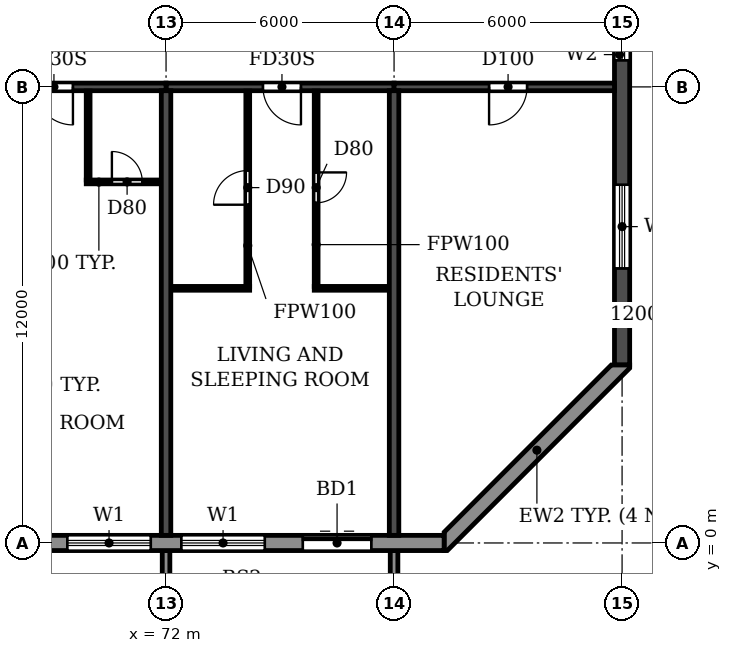
"""IFC4 building model, lengths in metres.
Left out: names, types, materials, properties, quantities, classifications, styles, units other than length and angle.
Written with IfcOpenShell. Run it as: python <this file> out.ifc"""

import sys

from ifc_helpers import new_model, si_unit, direction, frame, frame_2d, origin, place, context, subcontext, project, spatial, polyline, rectangle, outline, extrude, source, transform, mapped, element, fill, save


model = new_model("IFC4")
c1 = context("Model", 3, precision=1e-05, world=origin(), true_north=direction((0.0, 1.0)))
c2 = subcontext(c1, "Body", "Model", "MODEL_VIEW")
j1 = project(units=[si_unit("LENGTHUNIT", "METRE"), si_unit("PLANEANGLEUNIT", "RADIAN")], contexts=[c1])
p1 = place(None, origin())
s1 = spatial("IfcSite", under=j1, at=p1, CompositionType="ELEMENT")
p2 = place(p1, origin())
s2 = spatial("IfcBuilding", under=s1, at=p2, CompositionType="ELEMENT")
p3 = place(p2, frame((0.0, 0.0, 208.2)))
s3 = spatial("IfcBuildingStorey", under=s2, at=p3, CompositionType="ELEMENT", Elevation=208.2)
for number, where, z_axis, x_axis in (
    (1, (72.0, 0.2, 0.0), (0.0, 0.0, 1.0), (0.0, 1.0, 0.0)),
    (2, (78.0, 0.2, 0.0), (0.0, 0.0, 1.0), (0.0, 1.0, 0.0)),
):
    element("IfcWall", number, at=place(p3, frame(where, z_axis=z_axis, x_axis=x_axis)), inside=s3, PredefinedType="SHEAR", context=c2, shape_type="SweptSolid", body=[
        extrude(rectangle(XDim=11.7, YDim=0.25, at=frame_2d((5.85, 0.0))), origin(), (0.0, 0.0, 1.0), 3.0),
    ])
p4 = place(p3, frame((84.0, 4.683, 0.0), z_axis=(0.0, 0.0, 1.0), x_axis=(0.0, 1.0, 0.0)))
e3 = element("IfcWall", 3, at=p4, inside=s3, PredefinedType="SHEAR", context=c2, shape_type="SweptSolid", body=[
    extrude(rectangle(XDim=31.834, YDim=0.4, at=frame_2d((15.917, 0.0))), origin(), (0.0, 0.0, 1.0), 3.0),
])
p5 = place(p4, frame((23.817, 0.0, 0.9)))
e4 = element("IfcOpeningElement", 4, at=p5, cuts=e3, PredefinedType="OPENING", context=c2, shape_type="SweptSolid", body=[
    extrude(rectangle(XDim=1.2, YDim=1.5, at=frame_2d((0.6, 0.75))), frame((0.0, 0.21, 0.0), z_axis=(0.0, -1.0, 0.0), x_axis=(1.0, 0.0, 0.0)), (0.0, 0.0, 1.0), 0.42),
])
p6 = place(p4, frame((8.017, 0.0, 0.9)))
e5 = element("IfcOpeningElement", 5, at=p6, cuts=e3, PredefinedType="OPENING", context=c2, shape_type="SweptSolid", body=[
    extrude(rectangle(XDim=1.2, YDim=1.5, at=frame_2d((0.6, 0.75))), frame((0.0, 0.21, 0.0), z_axis=(0.0, -1.0, 0.0), x_axis=(1.0, 0.0, 0.0)), (0.0, 0.0, 1.0), 0.42),
])
p7 = place(p4, frame((27.694, 0.0, 0.6)))
e6 = element("IfcOpeningElement", 6, at=p7, cuts=e3, PredefinedType="OPENING", context=c2, shape_type="SweptSolid", body=[
    extrude(rectangle(XDim=2.2, YDim=1.8, at=frame_2d((1.1, 0.9))), frame((0.0, 0.21, 0.0), z_axis=(0.0, -1.0, 0.0), x_axis=(1.0, 0.0, 0.0)), (0.0, 0.0, 1.0), 0.42),
])
p8 = place(p4, frame((2.541, 0.0, 0.6)))
e7 = element("IfcOpeningElement", 7, at=p8, cuts=e3, PredefinedType="OPENING", context=c2, shape_type="SweptSolid", body=[
    extrude(rectangle(XDim=2.2, YDim=1.8, at=frame_2d((1.1, 0.9))), frame((0.0, 0.21, 0.0), z_axis=(0.0, -1.0, 0.0), x_axis=(1.0, 0.0, 0.0)), (0.0, 0.0, 1.0), 0.42),
])
p9 = place(p4, frame((15.917, 0.0, 0.9)))
e8 = element("IfcOpeningElement", 8, at=p9, cuts=e3, PredefinedType="OPENING", context=c2, shape_type="SweptSolid", body=[
    extrude(rectangle(XDim=1.2, YDim=1.5, at=frame_2d((0.6, 0.75))), frame((0.0, 0.21, 0.0), z_axis=(0.0, -1.0, 0.0), x_axis=(1.0, 0.0, 0.0)), (0.0, 0.0, 1.0), 0.42),
])
p10 = place(p3, frame((66.0, 12.0, 0.0), z_axis=(0.0, 0.0, 1.0), x_axis=(1.0, 0.0, 0.0)))
e9 = element("IfcWall", 9, at=p10, inside=s3, PredefinedType="SHEAR", context=c2, shape_type="SweptSolid", body=[
    extrude(rectangle(XDim=6.0, YDim=0.2, at=frame_2d((3.0, 0.0))), origin(), (0.0, 0.0, 1.0), 2.4),
])
p11 = place(p10, frame((2.55, 0.0, 0.0)))
e10 = element("IfcOpeningElement", 10, at=p11, cuts=e9, PredefinedType="OPENING", context=c2, shape_type="SweptSolid", body=[
    extrude(rectangle(XDim=1.0, YDim=2.1, at=frame_2d((0.5, 1.05))), frame((0.0, 0.11, 0.0), z_axis=(0.0, -1.0, 0.0), x_axis=(1.0, 0.0, 0.0)), (0.0, 0.0, 1.0), 0.22),
])
p12 = place(p3, frame((72.0, 12.0, 0.0), z_axis=(0.0, 0.0, 1.0), x_axis=(1.0, 0.0, 0.0)))
e11 = element("IfcWall", 11, at=p12, inside=s3, PredefinedType="SHEAR", context=c2, shape_type="SweptSolid", body=[
    extrude(rectangle(XDim=6.0, YDim=0.2, at=frame_2d((3.0, 0.0))), origin(), (0.0, 0.0, 1.0), 2.4),
])
p13 = place(p12, frame((2.55, 0.0, 0.0)))
e12 = element("IfcOpeningElement", 12, at=p13, cuts=e11, PredefinedType="OPENING", context=c2, shape_type="SweptSolid", body=[
    extrude(rectangle(XDim=1.0, YDim=2.1, at=frame_2d((0.5, 1.05))), frame((0.0, 0.11, 0.0), z_axis=(0.0, -1.0, 0.0), x_axis=(1.0, 0.0, 0.0)), (0.0, 0.0, 1.0), 0.22),
])
p14 = place(p3, frame((78.0, 12.0, 0.0), z_axis=(0.0, 0.0, 1.0), x_axis=(1.0, 0.0, 0.0)))
e13 = element("IfcWall", 13, at=p14, inside=s3, PredefinedType="SHEAR", context=c2, shape_type="SweptSolid", body=[
    extrude(rectangle(XDim=5.8, YDim=0.2, at=frame_2d((2.9, 0.0))), origin(), (0.0, 0.0, 1.0), 2.4),
])
p15 = place(p14, frame((2.5, 0.0, 0.0)))
e14 = element("IfcOpeningElement", 14, at=p15, cuts=e13, PredefinedType="OPENING", context=c2, shape_type="SweptSolid", body=[
    extrude(rectangle(XDim=1.0, YDim=2.1, at=frame_2d((0.5, 1.05))), frame((0.0, 0.11, 0.0), z_axis=(0.0, -1.0, 0.0), x_axis=(1.0, 0.0, 0.0)), (0.0, 0.0, 1.0), 0.22),
])
p16 = place(p3, frame((22.683, 0.0, 0.0), z_axis=(0.0, 0.0, 1.0), x_axis=(1.0, 0.0, 0.0)))
e15 = element("IfcWall", 15, at=p16, inside=s3, PredefinedType="STANDARD", context=c2, shape_type="SweptSolid", body=[
    extrude(rectangle(XDim=56.634, YDim=0.4, at=frame_2d((28.317, 0.0))), origin(), (0.0, 0.0, 1.0), 3.0),
])
p17 = place(p16, frame((1.917, 0.0, 0.0)))
e16 = element("IfcOpeningElement", 16, at=p17, cuts=e15, PredefinedType="OPENING", context=c2, shape_type="SweptSolid", body=[
    extrude(rectangle(XDim=1.8, YDim=2.4, at=frame_2d((0.9, 1.2))), frame((0.0, 0.21, 0.0), z_axis=(0.0, -1.0, 0.0), x_axis=(1.0, 0.0, 0.0)), (0.0, 0.0, 1.0), 0.42),
])
p18 = place(p16, frame((4.717, 0.0, 0.9)))
e17 = element("IfcOpeningElement", 17, at=p18, cuts=e15, PredefinedType="OPENING", context=c2, shape_type="SweptSolid", body=[
    extrude(rectangle(XDim=2.2, YDim=1.5, at=frame_2d((1.1, 0.75))), frame((0.0, 0.21, 0.0), z_axis=(0.0, -1.0, 0.0), x_axis=(1.0, 0.0, 0.0)), (0.0, 0.0, 1.0), 0.42),
])
p19 = place(p16, frame((7.717, 0.0, 0.9)))
e18 = element("IfcOpeningElement", 18, at=p19, cuts=e15, PredefinedType="OPENING", context=c2, shape_type="SweptSolid", body=[
    extrude(rectangle(XDim=2.2, YDim=1.5, at=frame_2d((1.1, 0.75))), frame((0.0, 0.21, 0.0), z_axis=(0.0, -1.0, 0.0), x_axis=(1.0, 0.0, 0.0)), (0.0, 0.0, 1.0), 0.42),
])
p20 = place(p16, frame((10.717, 0.0, 0.9)))
e19 = element("IfcOpeningElement", 19, at=p20, cuts=e15, PredefinedType="OPENING", context=c2, shape_type="SweptSolid", body=[
    extrude(rectangle(XDim=2.2, YDim=1.5, at=frame_2d((1.1, 0.75))), frame((0.0, 0.21, 0.0), z_axis=(0.0, -1.0, 0.0), x_axis=(1.0, 0.0, 0.0)), (0.0, 0.0, 1.0), 0.42),
])
p21 = place(p16, frame((13.917, 0.0, 0.0)))
e20 = element("IfcOpeningElement", 20, at=p21, cuts=e15, PredefinedType="OPENING", context=c2, shape_type="SweptSolid", body=[
    extrude(rectangle(XDim=1.8, YDim=2.4, at=frame_2d((0.9, 1.2))), frame((0.0, 0.21, 0.0), z_axis=(0.0, -1.0, 0.0), x_axis=(1.0, 0.0, 0.0)), (0.0, 0.0, 1.0), 0.42),
])
p22 = place(p16, frame((16.717, 0.0, 0.9)))
e21 = element("IfcOpeningElement", 21, at=p22, cuts=e15, PredefinedType="OPENING", context=c2, shape_type="SweptSolid", body=[
    extrude(rectangle(XDim=2.2, YDim=1.5, at=frame_2d((1.1, 0.75))), frame((0.0, 0.21, 0.0), z_axis=(0.0, -1.0, 0.0), x_axis=(1.0, 0.0, 0.0)), (0.0, 0.0, 1.0), 0.42),
])
p23 = place(p16, frame((19.717, 0.0, 0.9)))
e22 = element("IfcOpeningElement", 22, at=p23, cuts=e15, PredefinedType="OPENING", context=c2, shape_type="SweptSolid", body=[
    extrude(rectangle(XDim=2.2, YDim=1.5, at=frame_2d((1.1, 0.75))), frame((0.0, 0.21, 0.0), z_axis=(0.0, -1.0, 0.0), x_axis=(1.0, 0.0, 0.0)), (0.0, 0.0, 1.0), 0.42),
])
p24 = place(p16, frame((22.717, 0.0, 0.9)))
e23 = element("IfcOpeningElement", 23, at=p24, cuts=e15, PredefinedType="OPENING", context=c2, shape_type="SweptSolid", body=[
    extrude(rectangle(XDim=2.2, YDim=1.5, at=frame_2d((1.1, 0.75))), frame((0.0, 0.21, 0.0), z_axis=(0.0, -1.0, 0.0), x_axis=(1.0, 0.0, 0.0)), (0.0, 0.0, 1.0), 0.42),
])
p25 = place(p16, frame((25.917, 0.0, 0.0)))
e24 = element("IfcOpeningElement", 24, at=p25, cuts=e15, PredefinedType="OPENING", context=c2, shape_type="SweptSolid", body=[
    extrude(rectangle(XDim=1.8, YDim=2.4, at=frame_2d((0.9, 1.2))), frame((0.0, 0.21, 0.0), z_axis=(0.0, -1.0, 0.0), x_axis=(1.0, 0.0, 0.0)), (0.0, 0.0, 1.0), 0.42),
])
p26 = place(p16, frame((28.717, 0.0, 0.9)))
e25 = element("IfcOpeningElement", 25, at=p26, cuts=e15, PredefinedType="OPENING", context=c2, shape_type="SweptSolid", body=[
    extrude(rectangle(XDim=2.2, YDim=1.5, at=frame_2d((1.1, 0.75))), frame((0.0, 0.21, 0.0), z_axis=(0.0, -1.0, 0.0), x_axis=(1.0, 0.0, 0.0)), (0.0, 0.0, 1.0), 0.42),
])
p27 = place(p16, frame((31.717, 0.0, 0.9)))
e26 = element("IfcOpeningElement", 26, at=p27, cuts=e15, PredefinedType="OPENING", context=c2, shape_type="SweptSolid", body=[
    extrude(rectangle(XDim=2.2, YDim=1.5, at=frame_2d((1.1, 0.75))), frame((0.0, 0.21, 0.0), z_axis=(0.0, -1.0, 0.0), x_axis=(1.0, 0.0, 0.0)), (0.0, 0.0, 1.0), 0.42),
])
p28 = place(p16, frame((34.717, 0.0, 0.9)))
e27 = element("IfcOpeningElement", 27, at=p28, cuts=e15, PredefinedType="OPENING", context=c2, shape_type="SweptSolid", body=[
    extrude(rectangle(XDim=2.2, YDim=1.5, at=frame_2d((1.1, 0.75))), frame((0.0, 0.21, 0.0), z_axis=(0.0, -1.0, 0.0), x_axis=(1.0, 0.0, 0.0)), (0.0, 0.0, 1.0), 0.42),
])
p29 = place(p16, frame((37.717, 0.0, 0.9)))
e28 = element("IfcOpeningElement", 28, at=p29, cuts=e15, PredefinedType="OPENING", context=c2, shape_type="SweptSolid", body=[
    extrude(rectangle(XDim=2.2, YDim=1.5, at=frame_2d((1.1, 0.75))), frame((0.0, 0.21, 0.0), z_axis=(0.0, -1.0, 0.0), x_axis=(1.0, 0.0, 0.0)), (0.0, 0.0, 1.0), 0.42),
])
p30 = place(p16, frame((40.717, 0.0, 0.9)))
e29 = element("IfcOpeningElement", 29, at=p30, cuts=e15, PredefinedType="OPENING", context=c2, shape_type="SweptSolid", body=[
    extrude(rectangle(XDim=2.2, YDim=1.5, at=frame_2d((1.1, 0.75))), frame((0.0, 0.21, 0.0), z_axis=(0.0, -1.0, 0.0), x_axis=(1.0, 0.0, 0.0)), (0.0, 0.0, 1.0), 0.42),
])
p31 = place(p16, frame((43.717, 0.0, 0.9)))
e30 = element("IfcOpeningElement", 30, at=p31, cuts=e15, PredefinedType="OPENING", context=c2, shape_type="SweptSolid", body=[
    extrude(rectangle(XDim=2.2, YDim=1.5, at=frame_2d((1.1, 0.75))), frame((0.0, 0.21, 0.0), z_axis=(0.0, -1.0, 0.0), x_axis=(1.0, 0.0, 0.0)), (0.0, 0.0, 1.0), 0.42),
])
p32 = place(p16, frame((46.717, 0.0, 0.9)))
e31 = element("IfcOpeningElement", 31, at=p32, cuts=e15, PredefinedType="OPENING", context=c2, shape_type="SweptSolid", body=[
    extrude(rectangle(XDim=2.2, YDim=1.5, at=frame_2d((1.1, 0.75))), frame((0.0, 0.21, 0.0), z_axis=(0.0, -1.0, 0.0), x_axis=(1.0, 0.0, 0.0)), (0.0, 0.0, 1.0), 0.42),
])
p33 = place(p16, frame((49.717, 0.0, 0.9)))
e32 = element("IfcOpeningElement", 32, at=p33, cuts=e15, PredefinedType="OPENING", context=c2, shape_type="SweptSolid", body=[
    extrude(rectangle(XDim=2.2, YDim=1.5, at=frame_2d((1.1, 0.75))), frame((0.0, 0.21, 0.0), z_axis=(0.0, -1.0, 0.0), x_axis=(1.0, 0.0, 0.0)), (0.0, 0.0, 1.0), 0.42),
])
p34 = place(p16, frame((52.917, 0.0, 0.0)))
e33 = element("IfcOpeningElement", 33, at=p34, cuts=e15, PredefinedType="OPENING", context=c2, shape_type="SweptSolid", body=[
    extrude(rectangle(XDim=1.8, YDim=2.4, at=frame_2d((0.9, 1.2))), frame((0.0, 0.21, 0.0), z_axis=(0.0, -1.0, 0.0), x_axis=(1.0, 0.0, 0.0)), (0.0, 0.0, 1.0), 0.42),
])
p35 = place(p3, origin())
e34 = element("IfcWall", 34, at=p35, inside=s3, PredefinedType="STANDARD", context=c2, shape_type="SweptSolid", body=[
    extrude(outline(polyline([(79.317, -0.2), (79.4, -0.2), (84.2, 4.6), (84.2, 4.683), (83.717, 4.683), (79.317, 0.283), (79.317, -0.2)])), origin(), (0.0, 0.0, 1.0), 3.0),
])
m1 = source(origin(), c2, "Body", "SweptSolid", [
    extrude(outline(polyline([(0.0, 0.0), (0.2, 0.0), (0.2, 1.65), (0.0, 1.65), (0.0, 0.0)])), origin(), (0.0, 0.0, 1.0), 3.1),
])
for number, where in (
    (35, (71.9, -1.85, 0.0)),
    (36, (77.9, -1.85, 0.0)),
):
    element("IfcWall", number, at=place(p3, frame(where)), inside=s3, PredefinedType="STANDARD", context=c2, shape_type="MappedRepresentation", body=[
        mapped(m1, transform((0.0, 0.0, 0.0))),
    ])
p36 = place(p3, frame((72.135, 6.7, 0.0), z_axis=(0.0, 0.0, 1.0), x_axis=(1.0, 0.0, 0.0)))
e37 = element("IfcWall", 37, at=p36, inside=s3, PredefinedType="PARTITIONING", context=c2, shape_type="SweptSolid", body=[
    extrude(rectangle(XDim=2.065, YDim=0.1, at=frame_2d((1.032, 0.0))), origin(), (0.0, 0.0, 1.0), 3.0),
])
p37 = place(p3, frame((75.9, 6.7, 0.0), z_axis=(0.0, 0.0, 1.0), x_axis=(1.0, 0.0, 0.0)))
e38 = element("IfcWall", 38, at=p37, inside=s3, PredefinedType="PARTITIONING", context=c2, shape_type="SweptSolid", body=[
    extrude(rectangle(XDim=1.965, YDim=0.1, at=frame_2d((0.982, 0.0))), origin(), (0.0, 0.0, 1.0), 3.0),
])
p38 = place(p3, frame((69.9, 9.5, 0.0), z_axis=(0.0, 0.0, 1.0), x_axis=(1.0, 0.0, 0.0)))
e39 = element("IfcWall", 39, at=p38, inside=s3, PredefinedType="PARTITIONING", context=c2, shape_type="SweptSolid", body=[
    extrude(rectangle(XDim=1.965, YDim=0.1, at=frame_2d((0.982, 0.0))), origin(), (0.0, 0.0, 1.0), 3.0),
])
p39 = place(p38, frame((0.675, 0.0, 0.0)))
e40 = element("IfcOpeningElement", 40, at=p39, cuts=e39, PredefinedType="OPENING", context=c2, shape_type="SweptSolid", body=[
    extrude(rectangle(XDim=0.8, YDim=2.1, at=frame_2d((0.4, 1.05))), frame((0.0, 0.06, 0.0), z_axis=(0.0, -1.0, 0.0), x_axis=(1.0, 0.0, 0.0)), (0.0, 0.0, 1.0), 0.12),
])
p40 = place(p3, frame((69.95, 9.55, 0.0), z_axis=(0.0, 0.0, 1.0), x_axis=(0.0, 1.0, 0.0)))
e41 = element("IfcWall", 41, at=p40, inside=s3, PredefinedType="PARTITIONING", context=c2, shape_type="SweptSolid", body=[
    extrude(rectangle(XDim=2.34, YDim=0.1, at=frame_2d((1.17, 0.0))), origin(), (0.0, 0.0, 1.0), 3.0),
])
p41 = place(p3, frame((74.15, 6.75, 0.0), z_axis=(0.0, 0.0, 1.0), x_axis=(0.0, 1.0, 0.0)))
e42 = element("IfcWall", 42, at=p41, inside=s3, PredefinedType="PARTITIONING", context=c2, shape_type="SweptSolid", body=[
    extrude(rectangle(XDim=5.14, YDim=0.1, at=frame_2d((2.57, 0.0))), origin(), (0.0, 0.0, 1.0), 3.0),
])
p42 = place(p41, frame((2.15, 0.0, 0.0)))
e43 = element("IfcOpeningElement", 43, at=p42, cuts=e42, PredefinedType="OPENING", context=c2, shape_type="SweptSolid", body=[
    extrude(rectangle(XDim=0.9, YDim=2.1, at=frame_2d((0.45, 1.05))), frame((0.0, 0.06, 0.0), z_axis=(0.0, -1.0, 0.0), x_axis=(1.0, 0.0, 0.0)), (0.0, 0.0, 1.0), 0.12),
])
p43 = place(p3, frame((75.95, 6.75, 0.0), z_axis=(0.0, 0.0, 1.0), x_axis=(0.0, 1.0, 0.0)))
e44 = element("IfcWall", 44, at=p43, inside=s3, PredefinedType="PARTITIONING", context=c2, shape_type="SweptSolid", body=[
    extrude(rectangle(XDim=5.14, YDim=0.1, at=frame_2d((2.57, 0.0))), origin(), (0.0, 0.0, 1.0), 3.0),
])
p44 = place(p43, frame((2.2, 0.0, 0.0)))
e45 = element("IfcOpeningElement", 45, at=p44, cuts=e44, PredefinedType="OPENING", context=c2, shape_type="SweptSolid", body=[
    extrude(rectangle(XDim=0.8, YDim=2.1, at=frame_2d((0.4, 1.05))), frame((0.0, 0.06, 0.0), z_axis=(0.0, -1.0, 0.0), x_axis=(1.0, 0.0, 0.0)), (0.0, 0.0, 1.0), 0.12),
])
p45 = place(p32, origin())
e46 = element("IfcWindow", 46, at=p45, inside=s3, PartitioningType="DOUBLE_PANEL_HORIZONTAL", PredefinedType="WINDOW", context=c2, shape_type="SweptSolid", body=[
    extrude(rectangle(XDim=2.2, YDim=1.5, at=frame_2d((1.1, 0.75))), frame((0.0, 0.03, 0.0), z_axis=(0.0, -1.0, 0.0), x_axis=(1.0, 0.0, 0.0)), (0.0, 0.0, 1.0), 0.06),
])
fill(e31, e46)
p46 = place(p33, origin())
e47 = element("IfcWindow", 47, at=p46, inside=s3, PartitioningType="DOUBLE_PANEL_HORIZONTAL", PredefinedType="WINDOW", context=c2, shape_type="SweptSolid", body=[
    extrude(rectangle(XDim=2.2, YDim=1.5, at=frame_2d((1.1, 0.75))), frame((0.0, 0.03, 0.0), z_axis=(0.0, -1.0, 0.0), x_axis=(1.0, 0.0, 0.0)), (0.0, 0.0, 1.0), 0.06),
])
fill(e32, e47)
p47 = place(p34, origin())
e48 = element("IfcDoor", 48, at=p47, inside=s3, OperationType="DOUBLE_DOOR_SLIDING", PredefinedType="DOOR", context=c2, shape_type="SweptSolid", body=[
    extrude(rectangle(XDim=1.8, YDim=2.4, at=frame_2d((0.9, 1.2))), frame((0.0, 0.025, 0.0), z_axis=(0.0, -1.0, 0.0), x_axis=(1.0, 0.0, 0.0)), (0.0, 0.0, 1.0), 0.05),
])
fill(e33, e48)
p48 = place(p6, origin())
e49 = element("IfcWindow", 49, at=p48, inside=s3, PartitioningType="SINGLE_PANEL", PredefinedType="WINDOW", context=c2, shape_type="SweptSolid", body=[
    extrude(rectangle(XDim=1.2, YDim=1.5, at=frame_2d((0.6, 0.75))), frame((0.0, 0.03, 0.0), z_axis=(0.0, -1.0, 0.0), x_axis=(1.0, 0.0, 0.0)), (0.0, 0.0, 1.0), 0.06),
])
fill(e5, e49)
p49 = place(p8, origin())
e50 = element("IfcWindow", 50, at=p49, inside=s3, PartitioningType="DOUBLE_PANEL_HORIZONTAL", PredefinedType="WINDOW", context=c2, shape_type="SweptSolid", body=[
    extrude(rectangle(XDim=2.2, YDim=1.8, at=frame_2d((1.1, 0.9))), frame((0.0, 0.03, 0.0), z_axis=(0.0, -1.0, 0.0), x_axis=(1.0, 0.0, 0.0)), (0.0, 0.0, 1.0), 0.06),
])
fill(e7, e50)
p50 = place(p11, frame((1.0, 0.0, 0.0), z_axis=(0.0, 0.0, 1.0), x_axis=(-1.0, 0.0, 0.0)))
e51 = element("IfcDoor", 51, at=p50, inside=s3, OperationType="SINGLE_SWING_LEFT", PredefinedType="DOOR", context=c2, shape_type="SweptSolid", body=[
    extrude(rectangle(XDim=1.0, YDim=2.1, at=frame_2d((0.5, 1.05))), frame((0.0, 0.025, 0.0), z_axis=(0.0, -1.0, 0.0), x_axis=(1.0, 0.0, 0.0)), (0.0, 0.0, 1.0), 0.05),
])
fill(e10, e51)
p51 = place(p39, origin())
e52 = element("IfcDoor", 52, at=p51, inside=s3, OperationType="SINGLE_SWING_LEFT", PredefinedType="DOOR", context=c2, shape_type="SweptSolid", body=[
    extrude(rectangle(XDim=0.8, YDim=2.1, at=frame_2d((0.4, 1.05))), frame((0.0, 0.025, 0.0), z_axis=(0.0, -1.0, 0.0), x_axis=(1.0, 0.0, 0.0)), (0.0, 0.0, 1.0), 0.05),
])
fill(e40, e52)
p52 = place(p42, origin())
e53 = element("IfcDoor", 53, at=p52, inside=s3, OperationType="SINGLE_SWING_LEFT", PredefinedType="DOOR", context=c2, shape_type="SweptSolid", body=[
    extrude(rectangle(XDim=0.9, YDim=2.1, at=frame_2d((0.45, 1.05))), frame((0.0, 0.025, 0.0), z_axis=(0.0, -1.0, 0.0), x_axis=(1.0, 0.0, 0.0)), (0.0, 0.0, 1.0), 0.05),
])
fill(e43, e53)
p53 = place(p13, frame((1.0, 0.0, 0.0), z_axis=(0.0, 0.0, 1.0), x_axis=(-1.0, 0.0, 0.0)))
e54 = element("IfcDoor", 54, at=p53, inside=s3, OperationType="SINGLE_SWING_LEFT", PredefinedType="DOOR", context=c2, shape_type="SweptSolid", body=[
    extrude(rectangle(XDim=1.0, YDim=2.1, at=frame_2d((0.5, 1.05))), frame((0.0, 0.025, 0.0), z_axis=(0.0, -1.0, 0.0), x_axis=(1.0, 0.0, 0.0)), (0.0, 0.0, 1.0), 0.05),
])
fill(e12, e54)
p54 = place(p44, frame((0.8, 0.0, 0.0), z_axis=(0.0, 0.0, 1.0), x_axis=(-1.0, 0.0, 0.0)))
e55 = element("IfcDoor", 55, at=p54, inside=s3, OperationType="SINGLE_SWING_LEFT", PredefinedType="DOOR", context=c2, shape_type="SweptSolid", body=[
    extrude(rectangle(XDim=0.8, YDim=2.1, at=frame_2d((0.4, 1.05))), frame((0.0, 0.025, 0.0), z_axis=(0.0, -1.0, 0.0), x_axis=(1.0, 0.0, 0.0)), (0.0, 0.0, 1.0), 0.05),
])
fill(e45, e55)
p55 = place(p15, frame((1.0, 0.0, 0.0), z_axis=(0.0, 0.0, 1.0), x_axis=(-1.0, 0.0, 0.0)))
e56 = element("IfcDoor", 56, at=p55, inside=s3, OperationType="SINGLE_SWING_RIGHT", PredefinedType="DOOR", context=c2, shape_type="SweptSolid", body=[
    extrude(rectangle(XDim=1.0, YDim=2.1, at=frame_2d((0.5, 1.05))), frame((0.0, 0.025, 0.0), z_axis=(0.0, -1.0, 0.0), x_axis=(1.0, 0.0, 0.0)), (0.0, 0.0, 1.0), 0.05),
])
fill(e14, e56)
save(model, sys.argv[1])
